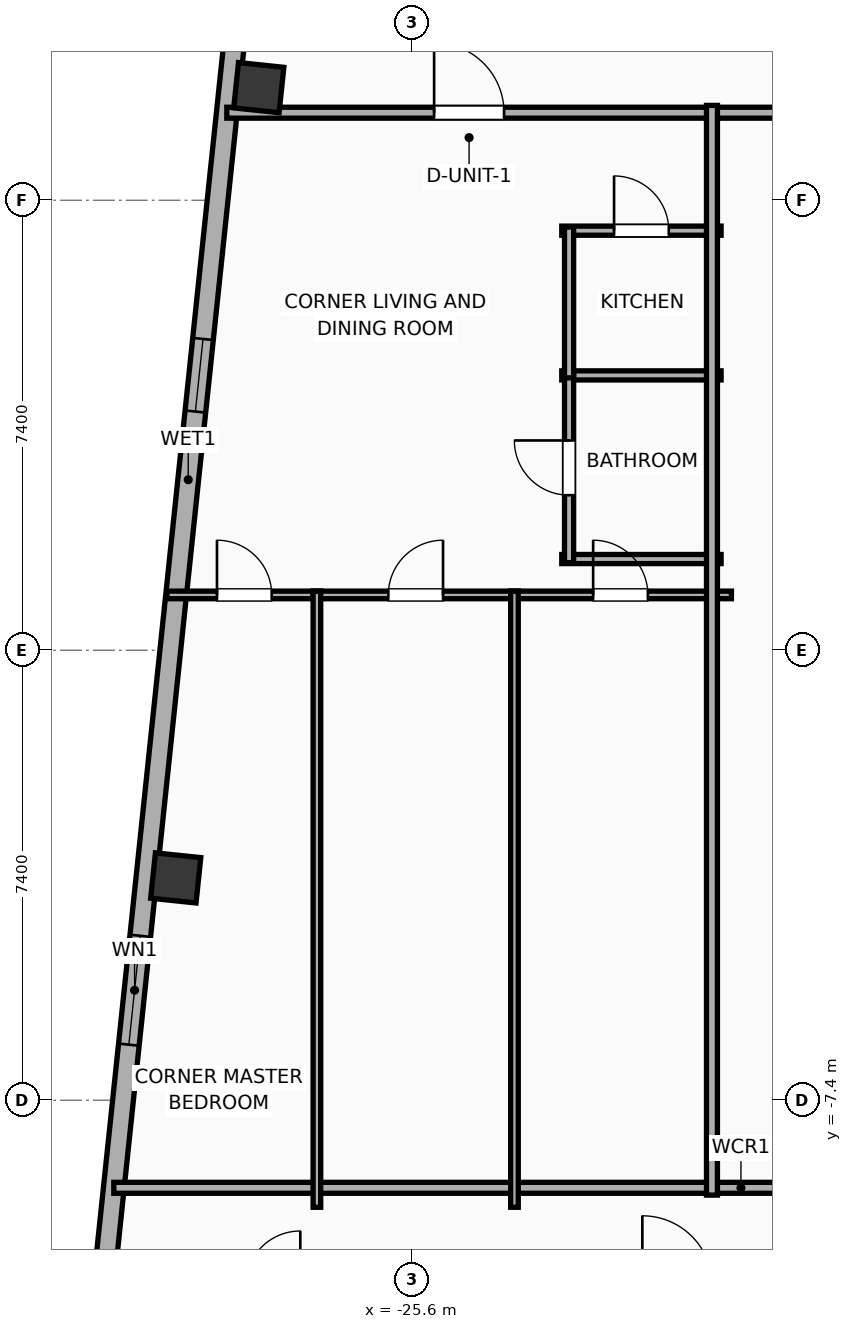
"""IFC4 building model, lengths in metres.
Left out: names, types, materials, properties, quantities, classifications, styles, units other than length and angle.
Written with IfcOpenShell. Run it as: python <this file> out.ifc"""

import sys

from ifc_helpers import new_model, si_unit, direction, frame, frame_2d, origin, origin_2d, place, context, subcontext, project, spatial, rectangle, hollow_rectangle, extrude, element, fill, save


model = new_model("IFC4")
c1 = context("Model", 3, precision=1e-05, world=origin(), true_north=direction((0.0, 1.0)))
c2 = subcontext(c1, "Body", "Model", "MODEL_VIEW")
j1 = project(units=[si_unit("LENGTHUNIT", "METRE"), si_unit("PLANEANGLEUNIT", "RADIAN")], contexts=[c1])
p1 = place(None, origin())
s1 = spatial("IfcSite", under=j1, at=p1, CompositionType="ELEMENT")
p2 = place(p1, origin())
s2 = spatial("IfcBuilding", under=s1, at=p2, CompositionType="ELEMENT")
p3 = place(p2, frame((0.0, 0.0, 263.9)))
s3 = spatial("IfcBuildingStorey", under=s2, at=p3, CompositionType="ELEMENT", Elevation=263.9)
for number, where, z_axis, x_axis in (
    (1, (-28.123, 9.252, 0.0), (0.0, 0.0, 1.0), (0.995, -0.105, 0.0)),
    (2, (-29.489, -3.744, 0.0), (0.0, 0.0, 1.0), (0.995, -0.105, 0.0)),
):
    element("IfcColumn", number, at=place(p3, frame(where, z_axis=z_axis, x_axis=x_axis)), inside=s3, PredefinedType="COLUMN", context=c2, shape_type="SweptSolid", body=[
        extrude(hollow_rectangle(XDim=0.75, YDim=0.75, WallThickness=0.025, at=origin_2d()), origin(), (0.0, 0.0, 1.0), 3.9),
    ])
p4 = place(p3, frame((-30.87, -12.296, 0.0), z_axis=(0.0, 0.0, 1.0), x_axis=(0.104533282919, 0.994521388791, 0.0)))
e3 = element("IfcWall", 3, at=p4, inside=s3, PredefinedType="ELEMENTEDWALL", context=c2, shape_type="SweptSolid", body=[
    extrude(rectangle(XDim=30.366, YDim=0.34, at=frame_2d((15.183, 0.0))), origin(), (0.0, 0.0, 1.0), 3.65),
])
p5 = place(p4, frame((5.842, 0.0, 0.75)))
e4 = element("IfcOpeningElement", 4, at=p5, cuts=e3, PredefinedType="OPENING", context=c2, shape_type="SweptSolid", body=[
    extrude(rectangle(XDim=1.8, YDim=2.1, at=frame_2d((0.9, 1.05))), frame((0.0, 0.18, 0.0), z_axis=(0.0, -1.0, 0.0), x_axis=(1.0, 0.0, 0.0)), (0.0, 0.0, 1.0), 0.36),
])
p6 = place(p4, frame((26.861, 0.0, 0.75)))
e5 = element("IfcOpeningElement", 5, at=p6, cuts=e3, PredefinedType="OPENING", context=c2, shape_type="SweptSolid", body=[
    extrude(rectangle(XDim=1.2, YDim=2.05, at=frame_2d((0.6, 1.025))), frame((0.0, 0.18, 0.0), z_axis=(0.0, -1.0, 0.0), x_axis=(1.0, 0.0, 0.0)), (0.0, 0.0, 1.0), 0.36),
])
p7 = place(p4, frame((16.311, 0.0, 0.75)))
e6 = element("IfcOpeningElement", 6, at=p7, cuts=e3, PredefinedType="OPENING", context=c2, shape_type="SweptSolid", body=[
    extrude(rectangle(XDim=1.2, YDim=2.05, at=frame_2d((0.6, 1.025))), frame((0.0, 0.18, 0.0), z_axis=(0.0, -1.0, 0.0), x_axis=(1.0, 0.0, 0.0)), (0.0, 0.0, 1.0), 0.36),
])
p8 = place(p3, frame((-28.649, 8.84, 0.0), z_axis=(0.0, 0.0, 1.0), x_axis=(1.0, 0.0, 0.0)))
e7 = element("IfcWall", 7, at=p8, inside=s3, PredefinedType="PARTITIONING", context=c2, shape_type="SweptSolid", body=[
    extrude(rectangle(XDim=18.769, YDim=0.18, at=frame_2d((9.384, 0.0))), origin(), (0.0, 0.0, 1.0), 3.09),
])
p9 = place(p8, frame((3.41, 0.0, 0.0)))
e8 = element("IfcOpeningElement", 8, at=p9, cuts=e7, PredefinedType="OPENING", context=c2, shape_type="SweptSolid", body=[
    extrude(rectangle(XDim=1.15, YDim=2.05, at=frame_2d((0.575, 1.025))), frame((0.0, 0.1, 0.0), z_axis=(0.0, -1.0, 0.0), x_axis=(1.0, 0.0, 0.0)), (0.0, 0.0, 1.0), 0.2),
])
p10 = place(p3, frame((-30.507, -8.84, 0.0), z_axis=(0.0, 0.0, 1.0), x_axis=(1.0, 0.0, 0.0)))
e9 = element("IfcWall", 9, at=p10, inside=s3, PredefinedType="PARTITIONING", context=c2, shape_type="SweptSolid", body=[
    extrude(rectangle(XDim=20.627, YDim=0.18, at=frame_2d((10.313, 0.0))), origin(), (0.0, 0.0, 1.0), 3.65),
])
p11 = place(p3, frame((-23.14, 6.9, 0.0), z_axis=(0.0, 0.0, 1.0), x_axis=(1.0, 0.0, 0.0)))
e10 = element("IfcWall", 10, at=p11, inside=s3, PredefinedType="PLUMBINGWALL", context=c2, shape_type="SweptSolid", body=[
    extrude(rectangle(XDim=2.62, YDim=0.15, at=frame_2d((1.31, 0.0))), origin(), (0.0, 0.0, 1.0), 3.65),
])
p12 = place(p11, frame((0.86, 0.0, 0.0)))
e11 = element("IfcOpeningElement", 11, at=p12, cuts=e10, PredefinedType="OPENING", context=c2, shape_type="SweptSolid", body=[
    extrude(rectangle(XDim=0.9, YDim=2.05, at=frame_2d((0.45, 1.025))), frame((0.0, 0.085, 0.0), z_axis=(0.0, -1.0, 0.0), x_axis=(1.0, 0.0, 0.0)), (0.0, 0.0, 1.0), 0.17),
])
for number, where, z_axis, x_axis in (
    (12, (-23.14, 4.52, 0.0), (0.0, 0.0, 1.0), (1.0, 0.0, 0.0)),
    (13, (-23.14, 1.5, 0.0), (0.0, 0.0, 1.0), (1.0, 0.0, 0.0)),
):
    element("IfcWall", number, at=place(p3, frame(where, z_axis=z_axis, x_axis=x_axis)), inside=s3, PredefinedType="PLUMBINGWALL", context=c2, shape_type="SweptSolid", body=[
        extrude(rectangle(XDim=2.62, YDim=0.15, at=frame_2d((1.31, 0.0))), origin(), (0.0, 0.0, 1.0), 3.65),
    ])
p13 = place(p3, frame((-23.02, 1.44, 0.0), z_axis=(0.0, 0.0, 1.0), x_axis=(0.0, 1.0, 0.0)))
e14 = element("IfcWall", 14, at=p13, inside=s3, PredefinedType="PLUMBINGWALL", context=c2, shape_type="SweptSolid", body=[
    extrude(rectangle(XDim=3.12, YDim=0.15, at=frame_2d((1.56, 0.0))), origin(), (0.0, 0.0, 1.0), 3.65),
])
p14 = place(p13, frame((1.11, 0.0, 0.0)))
e15 = element("IfcOpeningElement", 15, at=p14, cuts=e14, PredefinedType="OPENING", context=c2, shape_type="SweptSolid", body=[
    extrude(rectangle(XDim=0.9, YDim=2.05, at=frame_2d((0.45, 1.025))), frame((0.0, 0.085, 0.0), z_axis=(0.0, -1.0, 0.0), x_axis=(1.0, 0.0, 0.0)), (0.0, 0.0, 1.0), 0.17),
])
p15 = place(p3, frame((-23.02, 4.48, 0.0), z_axis=(0.0, 0.0, 1.0), x_axis=(0.0, 1.0, 0.0)))
e16 = element("IfcWall", 16, at=p15, inside=s3, PredefinedType="PLUMBINGWALL", context=c2, shape_type="SweptSolid", body=[
    extrude(rectangle(XDim=2.48, YDim=0.15, at=frame_2d((1.24, 0.0))), origin(), (0.0, 0.0, 1.0), 3.65),
])
p16 = place(p3, frame((-29.633, 0.91, 0.0), z_axis=(0.0, 0.0, 1.0), x_axis=(1.0, 0.0, 0.0)))
e17 = element("IfcWall", 17, at=p16, inside=s3, PredefinedType="PARTITIONING", context=c2, shape_type="SweptSolid", body=[
    extrude(rectangle(XDim=2.529, YDim=0.125, at=frame_2d((1.264, 0.0))), origin(), (0.0, 0.0, 1.0), 3.65),
])
p17 = place(p16, frame((0.823, 0.0, 0.0)))
e18 = element("IfcOpeningElement", 18, at=p17, cuts=e17, PredefinedType="OPENING", context=c2, shape_type="SweptSolid", body=[
    extrude(rectangle(XDim=0.9, YDim=2.05, at=frame_2d((0.45, 1.025))), frame((0.0, 0.073, 0.0), z_axis=(0.0, -1.0, 0.0), x_axis=(1.0, 0.0, 0.0)), (0.0, 0.0, 1.0), 0.145),
])
p18 = place(p3, frame((-27.229, 0.91, 0.0), z_axis=(0.0, 0.0, 1.0), x_axis=(1.0, 0.0, 0.0)))
e19 = element("IfcWall", 19, at=p18, inside=s3, PredefinedType="PARTITIONING", context=c2, shape_type="SweptSolid", body=[
    extrude(rectangle(XDim=3.374, YDim=0.125, at=frame_2d((1.687, 0.0))), origin(), (0.0, 0.0, 1.0), 3.65),
])
p19 = place(p18, frame((1.237, 0.0, 0.0)))
e20 = element("IfcOpeningElement", 20, at=p19, cuts=e19, PredefinedType="OPENING", context=c2, shape_type="SweptSolid", body=[
    extrude(rectangle(XDim=0.9, YDim=2.05, at=frame_2d((0.45, 1.025))), frame((0.0, 0.073, 0.0), z_axis=(0.0, -1.0, 0.0), x_axis=(1.0, 0.0, 0.0)), (0.0, 0.0, 1.0), 0.145),
])
p20 = place(p3, frame((-23.98, 0.91, 0.0), z_axis=(0.0, 0.0, 1.0), x_axis=(1.0, 0.0, 0.0)))
e21 = element("IfcWall", 21, at=p20, inside=s3, PredefinedType="PARTITIONING", context=c2, shape_type="SweptSolid", body=[
    extrude(rectangle(XDim=3.63, YDim=0.125, at=frame_2d((1.815, 0.0))), origin(), (0.0, 0.0, 1.0), 3.65),
])
p21 = place(p20, frame((1.356, 0.0, 0.0)))
e22 = element("IfcOpeningElement", 22, at=p21, cuts=e21, PredefinedType="OPENING", context=c2, shape_type="SweptSolid", body=[
    extrude(rectangle(XDim=0.9, YDim=2.05, at=frame_2d((0.45, 1.025))), frame((0.0, 0.073, 0.0), z_axis=(0.0, -1.0, 0.0), x_axis=(1.0, 0.0, 0.0)), (0.0, 0.0, 1.0), 0.145),
])
for number, where, z_axis, x_axis in (
    (23, (-23.918, -9.16, 0.0), (0.0, 0.0, 1.0), (0.0, 1.0, 0.0)),
    (24, (-27.167, -9.16, 0.0), (0.0, 0.0, 1.0), (0.0, 1.0, 0.0)),
):
    element("IfcWall", number, at=place(p3, frame(where, z_axis=z_axis, x_axis=x_axis)), inside=s3, PredefinedType="PARTITIONING", context=c2, shape_type="SweptSolid", body=[
        extrude(rectangle(XDim=10.13, YDim=0.125, at=frame_2d((5.065, 0.0))), origin(), (0.0, 0.0, 1.0), 3.65),
    ])
p22 = place(p3, frame((-20.67, -8.96, 0.0), z_axis=(0.0, 0.0, 1.0), x_axis=(0.0, 1.0, 0.0)))
e25 = element("IfcWall", 25, at=p22, inside=s3, PredefinedType="PARTITIONING", context=c2, shape_type="SweptSolid", body=[
    extrude(rectangle(XDim=17.92, YDim=0.18, at=frame_2d((8.96, 0.0))), origin(), (0.0, 0.0, 1.0), 3.65),
])
p23 = place(p5, origin())
e26 = element("IfcWindow", 26, at=p23, inside=s3, PartitioningType="SINGLE_PANEL", PredefinedType="WINDOW", context=c2, shape_type="SweptSolid", body=[
    extrude(rectangle(XDim=1.8, YDim=2.1, at=frame_2d((0.9, 1.05))), frame((0.0, 0.03, 0.0), z_axis=(0.0, -1.0, 0.0), x_axis=(1.0, 0.0, 0.0)), (0.0, 0.0, 1.0), 0.06),
])
fill(e4, e26)
p24 = place(p7, origin())
e27 = element("IfcWindow", 27, at=p24, inside=s3, PartitioningType="SINGLE_PANEL", PredefinedType="WINDOW", context=c2, shape_type="SweptSolid", body=[
    extrude(rectangle(XDim=1.2, YDim=2.05, at=frame_2d((0.6, 1.025))), frame((0.0, 0.03, 0.0), z_axis=(0.0, -1.0, 0.0), x_axis=(1.0, 0.0, 0.0)), (0.0, 0.0, 1.0), 0.06),
])
fill(e6, e27)
p25 = place(p9, origin())
e28 = element("IfcDoor", 28, at=p25, inside=s3, OperationType="SINGLE_SWING_LEFT", PredefinedType="DOOR", context=c2, shape_type="SweptSolid", body=[
    extrude(rectangle(XDim=1.15, YDim=2.05, at=frame_2d((0.575, 1.025))), frame((0.0, 0.025, 0.0), z_axis=(0.0, -1.0, 0.0), x_axis=(1.0, 0.0, 0.0)), (0.0, 0.0, 1.0), 0.05),
])
fill(e8, e28)
p26 = place(p12, origin())
e29 = element("IfcDoor", 29, at=p26, inside=s3, OperationType="SINGLE_SWING_LEFT", PredefinedType="DOOR", context=c2, shape_type="SweptSolid", body=[
    extrude(rectangle(XDim=0.9, YDim=2.05, at=frame_2d((0.45, 1.025))), frame((0.0, 0.025, 0.0), z_axis=(0.0, -1.0, 0.0), x_axis=(1.0, 0.0, 0.0)), (0.0, 0.0, 1.0), 0.05),
])
fill(e11, e29)
p27 = place(p14, origin())
e30 = element("IfcDoor", 30, at=p27, inside=s3, OperationType="SINGLE_SWING_RIGHT", PredefinedType="DOOR", context=c2, shape_type="SweptSolid", body=[
    extrude(rectangle(XDim=0.9, YDim=2.05, at=frame_2d((0.45, 1.025))), frame((0.0, 0.025, 0.0), z_axis=(0.0, -1.0, 0.0), x_axis=(1.0, 0.0, 0.0)), (0.0, 0.0, 1.0), 0.05),
])
fill(e15, e30)
p28 = place(p17, origin())
e31 = element("IfcDoor", 31, at=p28, inside=s3, OperationType="SINGLE_SWING_LEFT", PredefinedType="DOOR", context=c2, shape_type="SweptSolid", body=[
    extrude(rectangle(XDim=0.9, YDim=2.05, at=frame_2d((0.45, 1.025))), frame((0.0, 0.025, 0.0), z_axis=(0.0, -1.0, 0.0), x_axis=(1.0, 0.0, 0.0)), (0.0, 0.0, 1.0), 0.05),
])
fill(e18, e31)
p29 = place(p19, origin())
e32 = element("IfcDoor", 32, at=p29, inside=s3, OperationType="SINGLE_SWING_RIGHT", PredefinedType="DOOR", context=c2, shape_type="SweptSolid", body=[
    extrude(rectangle(XDim=0.9, YDim=2.05, at=frame_2d((0.45, 1.025))), frame((0.0, 0.025, 0.0), z_axis=(0.0, -1.0, 0.0), x_axis=(1.0, 0.0, 0.0)), (0.0, 0.0, 1.0), 0.05),
])
fill(e20, e32)
p30 = place(p21, origin())
e33 = element("IfcDoor", 33, at=p30, inside=s3, OperationType="SINGLE_SWING_LEFT", PredefinedType="DOOR", context=c2, shape_type="SweptSolid", body=[
    extrude(rectangle(XDim=0.9, YDim=2.05, at=frame_2d((0.45, 1.025))), frame((0.0, 0.025, 0.0), z_axis=(0.0, -1.0, 0.0), x_axis=(1.0, 0.0, 0.0)), (0.0, 0.0, 1.0), 0.05),
])
fill(e22, e33)
save(model, sys.argv[1])
